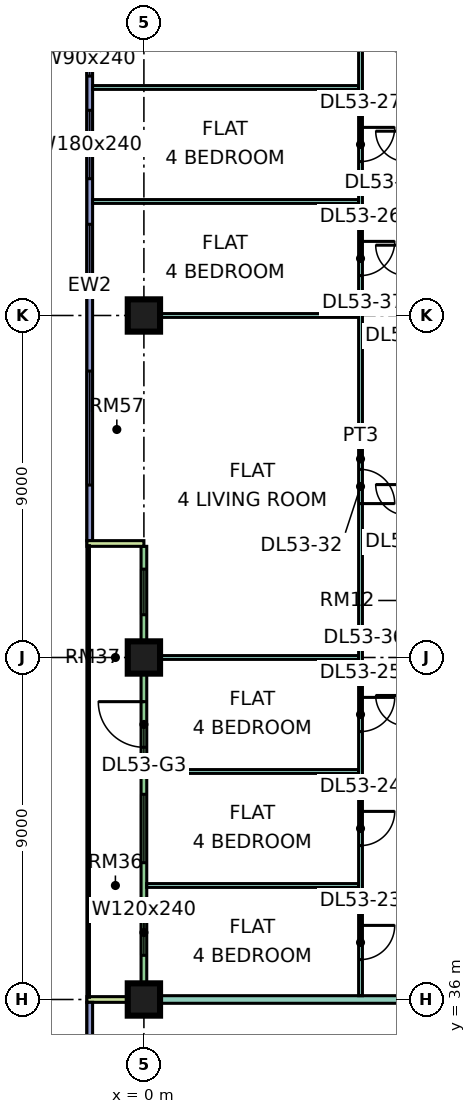
"""IFC4 building model, lengths in metres.
Left out: names, types, materials, properties, quantities, classifications, styles, units other than length and angle.
Written with IfcOpenShell. Run it as: python <this file> out.ifc"""

import sys

from ifc_helpers import new_model, si_unit, direction, frame, frame_2d, origin, origin_2d, place, context, subcontext, project, spatial, rectangle, extrude, element, fill, save


model = new_model("IFC4")
c1 = context("Model", 3, precision=1e-05, world=origin(), true_north=direction((0.0, 1.0)))
c2 = subcontext(c1, "Body", "Model", "MODEL_VIEW")
j1 = project(units=[si_unit("LENGTHUNIT", "METRE"), si_unit("PLANEANGLEUNIT", "RADIAN")], contexts=[c1])
p1 = place(None, origin())
s1 = spatial("IfcSite", under=j1, at=p1, CompositionType="ELEMENT")
p2 = place(p1, origin())
s2 = spatial("IfcBuilding", under=s1, at=p2, CompositionType="ELEMENT")
p3 = place(p2, frame((0.0, 0.0, 226.65)))
s3 = spatial("IfcBuildingStorey", under=s2, at=p3, CompositionType="ELEMENT", Elevation=226.65)
p4 = place(p3, frame((0.0, 36.0, 0.0), z_axis=(0.0, 0.0, 1.0), x_axis=(1.0, 0.0, 0.0)))
e1 = element("IfcColumn", 1, at=p4, inside=s3, PredefinedType="COLUMN", context=c2, shape_type="SweptSolid", body=[
    extrude(rectangle(XDim=0.85, YDim=0.85, at=origin_2d()), origin(), (0.0, 0.0, 1.0), 3.75),
])
p5 = place(p3, frame((0.0, 45.0, 0.0), z_axis=(0.0, 0.0, 1.0), x_axis=(1.0, 0.0, 0.0)))
e2 = element("IfcColumn", 2, at=p5, inside=s3, PredefinedType="COLUMN", context=c2, shape_type="SweptSolid", body=[
    extrude(rectangle(XDim=0.85, YDim=0.85, at=origin_2d()), origin(), (0.0, 0.0, 1.0), 3.75),
])
p6 = place(p3, frame((0.0, 54.0, 0.0), z_axis=(0.0, 0.0, 1.0), x_axis=(1.0, 0.0, 0.0)))
e3 = element("IfcColumn", 3, at=p6, inside=s3, PredefinedType="COLUMN", context=c2, shape_type="SweptSolid", body=[
    extrude(rectangle(XDim=0.85, YDim=0.85, at=origin_2d()), origin(), (0.0, 0.0, 1.0), 3.75),
])
p7 = place(p3, frame((-1.425, 61.5, 0.0), z_axis=(0.0, 0.0, 1.0), x_axis=(0.0, -1.0, 0.0)))
e4 = element("IfcWall", 4, at=p7, inside=s3, PredefinedType="SOLIDWALL", context=c2, shape_type="SweptSolid", body=[
    extrude(rectangle(XDim=13.425, YDim=0.15, at=frame_2d((6.712, 0.0))), origin(), (0.0, 0.0, 1.0), 3.35),
])
p8 = place(p7, frame((0.3, 0.0, 0.45)))
e5 = element("IfcOpeningElement", 5, at=p8, cuts=e4, PredefinedType="OPENING", context=c2, shape_type="SweptSolid", body=[
    extrude(rectangle(XDim=0.9, YDim=2.4, at=frame_2d((0.45, 1.2))), frame((0.0, 0.085, 0.0), z_axis=(0.0, -1.0, 0.0), x_axis=(1.0, 0.0, 0.0)), (0.0, 0.0, 1.0), 0.17),
])
p9 = place(p7, frame((2.1, 0.0, 0.45)))
e6 = element("IfcOpeningElement", 6, at=p9, cuts=e4, PredefinedType="OPENING", context=c2, shape_type="SweptSolid", body=[
    extrude(rectangle(XDim=1.8, YDim=2.4, at=frame_2d((0.9, 1.2))), frame((0.0, 0.085, 0.0), z_axis=(0.0, -1.0, 0.0), x_axis=(1.0, 0.0, 0.0)), (0.0, 0.0, 1.0), 0.17),
])
p10 = place(p7, frame((5.1, 0.0, 0.45)))
e7 = element("IfcOpeningElement", 7, at=p10, cuts=e4, PredefinedType="OPENING", context=c2, shape_type="SweptSolid", body=[
    extrude(rectangle(XDim=1.8, YDim=2.4, at=frame_2d((0.9, 1.2))), frame((0.0, 0.085, 0.0), z_axis=(0.0, -1.0, 0.0), x_axis=(1.0, 0.0, 0.0)), (0.0, 0.0, 1.0), 0.17),
])
p11 = place(p7, frame((8.962, 0.0, 0.45)))
e8 = element("IfcOpeningElement", 8, at=p11, cuts=e4, PredefinedType="OPENING", context=c2, shape_type="SweptSolid", body=[
    extrude(rectangle(XDim=3.0, YDim=2.4, at=frame_2d((1.5, 1.2))), frame((0.0, 0.085, 0.0), z_axis=(0.0, -1.0, 0.0), x_axis=(1.0, 0.0, 0.0)), (0.0, 0.0, 1.0), 0.17),
])
p12 = place(p3, frame((0.0, 47.925, 0.0), z_axis=(0.0, 0.0, 1.0), x_axis=(0.0, -1.0, 0.0)))
e9 = element("IfcWall", 9, at=p12, inside=s3, PredefinedType="SOLIDWALL", context=c2, shape_type="SweptSolid", body=[
    extrude(rectangle(XDim=11.85, YDim=0.15, at=frame_2d((5.925, 0.0))), origin(), (0.0, 0.0, 1.0), 3.35),
])
p13 = place(p12, frame((0.6, 0.0, 0.45)))
e10 = element("IfcOpeningElement", 10, at=p13, cuts=e9, PredefinedType="OPENING", context=c2, shape_type="SweptSolid", body=[
    extrude(rectangle(XDim=1.2, YDim=2.4, at=frame_2d((0.6, 1.2))), frame((0.0, 0.085, 0.0), z_axis=(0.0, -1.0, 0.0), x_axis=(1.0, 0.0, 0.0)), (0.0, 0.0, 1.0), 0.17),
])
p14 = place(p12, frame((4.087, 0.0, 0.0)))
e11 = element("IfcOpeningElement", 11, at=p14, cuts=e9, PredefinedType="OPENING", context=c2, shape_type="SweptSolid", body=[
    extrude(rectangle(XDim=1.2, YDim=2.4, at=frame_2d((0.6, 1.2))), frame((0.0, 0.085, 0.0), z_axis=(0.0, -1.0, 0.0), x_axis=(1.0, 0.0, 0.0)), (0.0, 0.0, 1.0), 0.17),
])
p15 = place(p12, frame((6.525, 0.0, 0.45)))
e12 = element("IfcOpeningElement", 12, at=p15, cuts=e9, PredefinedType="OPENING", context=c2, shape_type="SweptSolid", body=[
    extrude(rectangle(XDim=1.8, YDim=2.4, at=frame_2d((0.9, 1.2))), frame((0.0, 0.085, 0.0), z_axis=(0.0, -1.0, 0.0), x_axis=(1.0, 0.0, 0.0)), (0.0, 0.0, 1.0), 0.17),
])
p16 = place(p12, frame((9.562, 0.0, 0.45)))
e13 = element("IfcOpeningElement", 13, at=p16, cuts=e9, PredefinedType="OPENING", context=c2, shape_type="SweptSolid", body=[
    extrude(rectangle(XDim=1.2, YDim=2.4, at=frame_2d((0.6, 1.2))), frame((0.0, 0.085, 0.0), z_axis=(0.0, -1.0, 0.0), x_axis=(1.0, 0.0, 0.0)), (0.0, 0.0, 1.0), 0.17),
])
for number, where, z_axis, x_axis in (
    (14, (-1.5, 48.0, 0.0), (0.0, 0.0, 1.0), (1.0, 0.0, 0.0)),
    (15, (-1.5, 36.0, 0.0), (0.0, 0.0, 1.0), (1.0, 0.0, 0.0)),
):
    element("IfcWall", number, at=place(p3, frame(where, z_axis=z_axis, x_axis=x_axis)), inside=s3, PredefinedType="SOLIDWALL", context=c2, shape_type="SweptSolid", body=[
        extrude(rectangle(XDim=1.5, YDim=0.15, at=frame_2d((0.75, 0.0))), origin(), (0.0, 0.0, 1.0), 3.35),
    ])
p17 = place(p3, frame((-1.425, 35.925, 0.0), z_axis=(0.0, 0.0, 1.0), x_axis=(0.0, -1.0, 0.0)))
e16 = element("IfcWall", 16, at=p17, inside=s3, PredefinedType="SOLIDWALL", context=c2, shape_type="SweptSolid", body=[
    extrude(rectangle(XDim=11.85, YDim=0.15, at=frame_2d((5.925, 0.0))), origin(), (0.0, 0.0, 1.0), 3.35),
])
p18 = place(p17, frame((1.462, 0.0, 0.45)))
e17 = element("IfcOpeningElement", 17, at=p18, cuts=e16, PredefinedType="OPENING", context=c2, shape_type="SweptSolid", body=[
    extrude(rectangle(XDim=3.0, YDim=2.4, at=frame_2d((1.5, 1.2))), frame((0.0, 0.085, 0.0), z_axis=(0.0, -1.0, 0.0), x_axis=(1.0, 0.0, 0.0)), (0.0, 0.0, 1.0), 0.17),
])
p19 = place(p17, frame((6.525, 0.0, 0.45)))
e18 = element("IfcOpeningElement", 18, at=p19, cuts=e16, PredefinedType="OPENING", context=c2, shape_type="SweptSolid", body=[
    extrude(rectangle(XDim=1.8, YDim=2.4, at=frame_2d((0.9, 1.2))), frame((0.0, 0.085, 0.0), z_axis=(0.0, -1.0, 0.0), x_axis=(1.0, 0.0, 0.0)), (0.0, 0.0, 1.0), 0.17),
])
p20 = place(p17, frame((9.488, 0.0, 0.45)))
e19 = element("IfcOpeningElement", 19, at=p20, cuts=e16, PredefinedType="OPENING", context=c2, shape_type="SweptSolid", body=[
    extrude(rectangle(XDim=1.8, YDim=2.4, at=frame_2d((0.9, 1.2))), frame((0.0, 0.085, 0.0), z_axis=(0.0, -1.0, 0.0), x_axis=(1.0, 0.0, 0.0)), (0.0, 0.0, 1.0), 0.17),
])
for number, where, z_axis, x_axis in (
    (20, (-1.351, 57.0, 0.0), (0.0, 0.0, 1.0), (1.0, 0.0, 0.0)),
    (21, (-1.351, 60.0, 0.0), (0.0, 0.0, 1.0), (1.0, 0.0, 0.0)),
):
    element("IfcWall", number, at=place(p3, frame(where, z_axis=z_axis, x_axis=x_axis)), inside=s3, PredefinedType="PARTITIONING", context=c2, shape_type="SweptSolid", body=[
        extrude(rectangle(XDim=7.001, YDim=0.1, at=frame_2d((3.5, 0.0))), origin(), (0.0, 0.0, 1.0), 3.35),
    ])
e22 = element("IfcWall", 22, at=p4, inside=s3, PredefinedType="PARTITIONING", context=c2, shape_type="SweptSolid", body=[
    extrude(rectangle(XDim=9.5, YDim=0.2, at=frame_2d((4.75, 0.0))), origin(), (0.0, 0.0, 1.0), 3.35),
])
e23 = element("IfcWall", 23, at=p6, inside=s3, PredefinedType="PARTITIONING", context=c2, shape_type="SweptSolid", body=[
    extrude(rectangle(XDim=5.65, YDim=0.1, at=frame_2d((2.825, 0.0))), origin(), (0.0, 0.0, 1.0), 3.35),
])
for number, where, z_axis, x_axis in (
    (24, (0.074, 39.0, 0.0), (0.0, 0.0, 1.0), (1.0, 0.0, 0.0)),
    (25, (0.074, 42.0, 0.0), (0.0, 0.0, 1.0), (1.0, 0.0, 0.0)),
    (26, (0.074, 45.0, 0.0), (0.0, 0.0, 1.0), (1.0, 0.0, 0.0)),
):
    element("IfcWall", number, at=place(p3, frame(where, z_axis=z_axis, x_axis=x_axis)), inside=s3, PredefinedType="PARTITIONING", context=c2, shape_type="SweptSolid", body=[
        extrude(rectangle(XDim=5.576, YDim=0.1, at=frame_2d((2.788, 0.0))), origin(), (0.0, 0.0, 1.0), 3.35),
    ])
p21 = place(p3, frame((5.7, 36.1, 0.0), z_axis=(0.0, 0.0, 1.0), x_axis=(0.0, 1.0, 0.0)))
e27 = element("IfcWall", 27, at=p21, inside=s3, PredefinedType="PARTITIONING", context=c2, shape_type="SweptSolid", body=[
    extrude(rectangle(XDim=28.25, YDim=0.1, at=frame_2d((14.125, 0.0))), origin(), (0.0, 0.0, 1.0), 3.35),
])
p22 = place(p21, frame((0.95, 0.0, 0.0)))
e28 = element("IfcOpeningElement", 28, at=p22, cuts=e27, PredefinedType="OPENING", context=c2, shape_type="SweptSolid", body=[
    extrude(rectangle(XDim=0.9, YDim=2.1, at=frame_2d((0.45, 1.05))), frame((0.0, 0.06, 0.0), z_axis=(0.0, -1.0, 0.0), x_axis=(1.0, 0.0, 0.0)), (0.0, 0.0, 1.0), 0.12),
])
p23 = place(p21, frame((3.95, 0.0, 0.0)))
e29 = element("IfcOpeningElement", 29, at=p23, cuts=e27, PredefinedType="OPENING", context=c2, shape_type="SweptSolid", body=[
    extrude(rectangle(XDim=0.9, YDim=2.1, at=frame_2d((0.45, 1.05))), frame((0.0, 0.06, 0.0), z_axis=(0.0, -1.0, 0.0), x_axis=(1.0, 0.0, 0.0)), (0.0, 0.0, 1.0), 0.12),
])
p24 = place(p21, frame((6.95, 0.0, 0.0)))
e30 = element("IfcOpeningElement", 30, at=p24, cuts=e27, PredefinedType="OPENING", context=c2, shape_type="SweptSolid", body=[
    extrude(rectangle(XDim=0.9, YDim=2.1, at=frame_2d((0.45, 1.05))), frame((0.0, 0.06, 0.0), z_axis=(0.0, -1.0, 0.0), x_axis=(1.0, 0.0, 0.0)), (0.0, 0.0, 1.0), 0.12),
])
p25 = place(p21, frame((18.95, 0.0, 0.0)))
e31 = element("IfcOpeningElement", 31, at=p25, cuts=e27, PredefinedType="OPENING", context=c2, shape_type="SweptSolid", body=[
    extrude(rectangle(XDim=0.9, YDim=2.1, at=frame_2d((0.45, 1.05))), frame((0.0, 0.06, 0.0), z_axis=(0.0, -1.0, 0.0), x_axis=(1.0, 0.0, 0.0)), (0.0, 0.0, 1.0), 0.12),
])
p26 = place(p21, frame((21.95, 0.0, 0.0)))
e32 = element("IfcOpeningElement", 32, at=p26, cuts=e27, PredefinedType="OPENING", context=c2, shape_type="SweptSolid", body=[
    extrude(rectangle(XDim=0.9, YDim=2.1, at=frame_2d((0.45, 1.05))), frame((0.0, 0.06, 0.0), z_axis=(0.0, -1.0, 0.0), x_axis=(1.0, 0.0, 0.0)), (0.0, 0.0, 1.0), 0.12),
])
p27 = place(p21, frame((24.95, 0.0, 0.0)))
e33 = element("IfcOpeningElement", 33, at=p27, cuts=e27, PredefinedType="OPENING", context=c2, shape_type="SweptSolid", body=[
    extrude(rectangle(XDim=0.9, YDim=2.1, at=frame_2d((0.45, 1.05))), frame((0.0, 0.06, 0.0), z_axis=(0.0, -1.0, 0.0), x_axis=(1.0, 0.0, 0.0)), (0.0, 0.0, 1.0), 0.12),
])
p28 = place(p21, frame((12.95, 0.0, 0.0)))
e34 = element("IfcOpeningElement", 34, at=p28, cuts=e27, PredefinedType="OPENING", context=c2, shape_type="SweptSolid", body=[
    extrude(rectangle(XDim=0.9, YDim=2.1, at=frame_2d((0.45, 1.05))), frame((0.0, 0.06, 0.0), z_axis=(0.0, -1.0, 0.0), x_axis=(1.0, 0.0, 0.0)), (0.0, 0.0, 1.0), 0.12),
])
p29 = place(p8, origin())
e35 = element("IfcWindow", 35, at=p29, inside=s3, PartitioningType="SINGLE_PANEL", PredefinedType="WINDOW", context=c2, shape_type="SweptSolid", body=[
    extrude(rectangle(XDim=0.9, YDim=2.4, at=frame_2d((0.45, 1.2))), frame((0.0, 0.03, 0.0), z_axis=(0.0, -1.0, 0.0), x_axis=(1.0, 0.0, 0.0)), (0.0, 0.0, 1.0), 0.06),
])
fill(e5, e35)
p30 = place(p9, origin())
e36 = element("IfcWindow", 36, at=p30, inside=s3, PartitioningType="SINGLE_PANEL", PredefinedType="WINDOW", context=c2, shape_type="SweptSolid", body=[
    extrude(rectangle(XDim=1.8, YDim=2.4, at=frame_2d((0.9, 1.2))), frame((0.0, 0.03, 0.0), z_axis=(0.0, -1.0, 0.0), x_axis=(1.0, 0.0, 0.0)), (0.0, 0.0, 1.0), 0.06),
])
fill(e6, e36)
p31 = place(p10, origin())
e37 = element("IfcWindow", 37, at=p31, inside=s3, PartitioningType="SINGLE_PANEL", PredefinedType="WINDOW", context=c2, shape_type="SweptSolid", body=[
    extrude(rectangle(XDim=1.8, YDim=2.4, at=frame_2d((0.9, 1.2))), frame((0.0, 0.03, 0.0), z_axis=(0.0, -1.0, 0.0), x_axis=(1.0, 0.0, 0.0)), (0.0, 0.0, 1.0), 0.06),
])
fill(e7, e37)
p32 = place(p11, origin())
e38 = element("IfcWindow", 38, at=p32, inside=s3, PartitioningType="SINGLE_PANEL", PredefinedType="WINDOW", context=c2, shape_type="SweptSolid", body=[
    extrude(rectangle(XDim=3.0, YDim=2.4, at=frame_2d((1.5, 1.2))), frame((0.0, 0.03, 0.0), z_axis=(0.0, -1.0, 0.0), x_axis=(1.0, 0.0, 0.0)), (0.0, 0.0, 1.0), 0.06),
])
fill(e8, e38)
p33 = place(p13, origin())
e39 = element("IfcWindow", 39, at=p33, inside=s3, PartitioningType="SINGLE_PANEL", PredefinedType="WINDOW", context=c2, shape_type="SweptSolid", body=[
    extrude(rectangle(XDim=1.2, YDim=2.4, at=frame_2d((0.6, 1.2))), frame((0.0, 0.03, 0.0), z_axis=(0.0, -1.0, 0.0), x_axis=(1.0, 0.0, 0.0)), (0.0, 0.0, 1.0), 0.06),
])
fill(e10, e39)
p34 = place(p14, frame((1.2, 0.0, 0.0), z_axis=(0.0, 0.0, 1.0), x_axis=(-1.0, 0.0, 0.0)))
e40 = element("IfcDoor", 40, at=p34, inside=s3, OperationType="DOUBLE_DOOR_SINGLE_SWING", PredefinedType="DOOR", context=c2, shape_type="SweptSolid", body=[
    extrude(rectangle(XDim=1.2, YDim=2.4, at=frame_2d((0.6, 1.2))), frame((0.0, 0.025, 0.0), z_axis=(0.0, -1.0, 0.0), x_axis=(1.0, 0.0, 0.0)), (0.0, 0.0, 1.0), 0.05),
])
fill(e11, e40)
p35 = place(p15, origin())
e41 = element("IfcWindow", 41, at=p35, inside=s3, PartitioningType="SINGLE_PANEL", PredefinedType="WINDOW", context=c2, shape_type="SweptSolid", body=[
    extrude(rectangle(XDim=1.8, YDim=2.4, at=frame_2d((0.9, 1.2))), frame((0.0, 0.03, 0.0), z_axis=(0.0, -1.0, 0.0), x_axis=(1.0, 0.0, 0.0)), (0.0, 0.0, 1.0), 0.06),
])
fill(e12, e41)
p36 = place(p16, origin())
e42 = element("IfcWindow", 42, at=p36, inside=s3, PartitioningType="SINGLE_PANEL", PredefinedType="WINDOW", context=c2, shape_type="SweptSolid", body=[
    extrude(rectangle(XDim=1.2, YDim=2.4, at=frame_2d((0.6, 1.2))), frame((0.0, 0.03, 0.0), z_axis=(0.0, -1.0, 0.0), x_axis=(1.0, 0.0, 0.0)), (0.0, 0.0, 1.0), 0.06),
])
fill(e13, e42)
p37 = place(p22, origin())
e43 = element("IfcDoor", 43, at=p37, inside=s3, OperationType="SINGLE_SWING_RIGHT", PredefinedType="DOOR", context=c2, shape_type="SweptSolid", body=[
    extrude(rectangle(XDim=0.9, YDim=2.1, at=frame_2d((0.45, 1.05))), frame((0.0, 0.025, 0.0), z_axis=(0.0, -1.0, 0.0), x_axis=(1.0, 0.0, 0.0)), (0.0, 0.0, 1.0), 0.05),
])
fill(e28, e43)
p38 = place(p23, origin())
e44 = element("IfcDoor", 44, at=p38, inside=s3, OperationType="SINGLE_SWING_RIGHT", PredefinedType="DOOR", context=c2, shape_type="SweptSolid", body=[
    extrude(rectangle(XDim=0.9, YDim=2.1, at=frame_2d((0.45, 1.05))), frame((0.0, 0.025, 0.0), z_axis=(0.0, -1.0, 0.0), x_axis=(1.0, 0.0, 0.0)), (0.0, 0.0, 1.0), 0.05),
])
fill(e29, e44)
p39 = place(p24, origin())
e45 = element("IfcDoor", 45, at=p39, inside=s3, OperationType="SINGLE_SWING_RIGHT", PredefinedType="DOOR", context=c2, shape_type="SweptSolid", body=[
    extrude(rectangle(XDim=0.9, YDim=2.1, at=frame_2d((0.45, 1.05))), frame((0.0, 0.025, 0.0), z_axis=(0.0, -1.0, 0.0), x_axis=(1.0, 0.0, 0.0)), (0.0, 0.0, 1.0), 0.05),
])
fill(e30, e45)
p40 = place(p25, origin())
e46 = element("IfcDoor", 46, at=p40, inside=s3, OperationType="SINGLE_SWING_RIGHT", PredefinedType="DOOR", context=c2, shape_type="SweptSolid", body=[
    extrude(rectangle(XDim=0.9, YDim=2.1, at=frame_2d((0.45, 1.05))), frame((0.0, 0.025, 0.0), z_axis=(0.0, -1.0, 0.0), x_axis=(1.0, 0.0, 0.0)), (0.0, 0.0, 1.0), 0.05),
])
fill(e31, e46)
p41 = place(p26, origin())
e47 = element("IfcDoor", 47, at=p41, inside=s3, OperationType="SINGLE_SWING_RIGHT", PredefinedType="DOOR", context=c2, shape_type="SweptSolid", body=[
    extrude(rectangle(XDim=0.9, YDim=2.1, at=frame_2d((0.45, 1.05))), frame((0.0, 0.025, 0.0), z_axis=(0.0, -1.0, 0.0), x_axis=(1.0, 0.0, 0.0)), (0.0, 0.0, 1.0), 0.05),
])
fill(e32, e47)
p42 = place(p28, frame((0.9, 0.0, 0.0), z_axis=(0.0, 0.0, 1.0), x_axis=(-1.0, 0.0, 0.0)))
e48 = element("IfcDoor", 48, at=p42, inside=s3, OperationType="SINGLE_SWING_LEFT", PredefinedType="DOOR", context=c2, shape_type="SweptSolid", body=[
    extrude(rectangle(XDim=0.9, YDim=2.1, at=frame_2d((0.45, 1.05))), frame((0.0, 0.025, 0.0), z_axis=(0.0, -1.0, 0.0), x_axis=(1.0, 0.0, 0.0)), (0.0, 0.0, 1.0), 0.05),
])
fill(e34, e48)
save(model, sys.argv[1])
